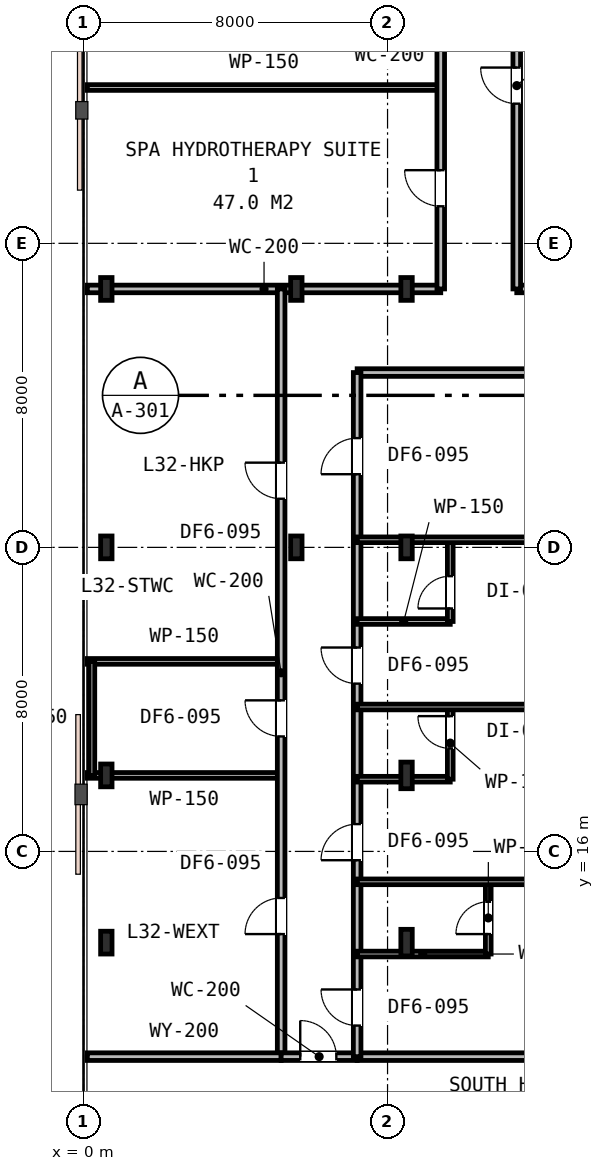
"""IFC4 building model, lengths in metres.
Left out: names, types, materials, properties, quantities, classifications, styles, units other than length and angle.
Written with IfcOpenShell. Run it as: python <this file> out.ifc"""

import sys

from ifc_helpers import new_model, si_unit, direction, frame, frame_2d, origin, origin_2d, place, context, subcontext, project, spatial, rectangle, i_section, extrude, element, fill, save


model = new_model("IFC4")
c1 = context("Model", 3, precision=1e-05, world=origin(), true_north=direction((0.0, 1.0)))
c2 = subcontext(c1, "Body", "Model", "MODEL_VIEW")
j1 = project(units=[si_unit("LENGTHUNIT", "METRE"), si_unit("PLANEANGLEUNIT", "RADIAN")], contexts=[c1])
p1 = place(None, origin())
s1 = spatial("IfcSite", under=j1, at=p1, CompositionType="ELEMENT")
p2 = place(p1, origin())
s2 = spatial("IfcBuilding", under=s1, at=p2, CompositionType="ELEMENT")
p3 = place(p2, frame((0.0, 0.0, 126.0)))
s3 = spatial("IfcBuildingStorey", under=s2, at=p3, CompositionType="ELEMENT", Elevation=126.0)
for number, where, z_axis, x_axis in (
    (1, (8.5, 24.0, 0.0), (0.0, 0.0, 1.0), (1.0, 0.0, 0.0)),
    (2, (5.6, 24.0, 0.0), (0.0, 0.0, 1.0), (1.0, 0.0, 0.0)),
    (3, (5.6, 30.8, 0.0), (0.0, 0.0, 1.0), (1.0, 0.0, 0.0)),
    (4, (8.5, 30.8, 0.0), (0.0, 0.0, 1.0), (1.0, 0.0, 0.0)),
    (5, (0.6, 24.0, 0.0), (0.0, 0.0, 1.0), (1.0, 0.0, 0.0)),
    (6, (0.6, 30.8, 0.0), (0.0, 0.0, 1.0), (1.0, 0.0, 0.0)),
    (7, (0.6, 13.6, 0.0), (0.0, 0.0, 1.0), (1.0, 0.0, 0.0)),
    (8, (0.6, 18.0, 0.0), (0.0, 0.0, 1.0), (1.0, 0.0, 0.0)),
):
    element("IfcColumn", number, at=place(p3, frame(where, z_axis=z_axis, x_axis=x_axis)), inside=s3, PredefinedType="COLUMN", context=c2, shape_type="SweptSolid", body=[
        extrude(i_section(OverallWidth=0.3, OverallDepth=0.6, WebThickness=0.015, FlangeThickness=0.03, FilletRadius=0.027, at=origin_2d()), origin(), (0.0, 0.0, 1.0), 3.6),
    ])
for number, where, z_axis, x_axis in (
    (9, (8.5, 13.6, 0.0), (0.0, 0.0, 1.0), (1.0, 0.0, 0.0)),
    (10, (8.5, 18.0, 0.0), (0.0, 0.0, 1.0), (1.0, 0.0, 0.0)),
):
    element("IfcColumn", number, at=place(p3, frame(where, z_axis=z_axis, x_axis=x_axis)), inside=s3, PredefinedType="COLUMN", context=c2, shape_type="SweptSolid", body=[
        extrude(i_section(OverallWidth=0.3, OverallDepth=0.7, WebThickness=0.017, FlangeThickness=0.032, FilletRadius=0.027, at=origin_2d()), origin(), (0.0, 0.0, 1.0), 3.6),
    ])
p4 = place(p3, frame((0.1, 30.8, 0.0), z_axis=(0.0, 0.0, 1.0), x_axis=(1.0, 0.0, 0.0)))
e11 = element("IfcWall", 11, at=p4, inside=s3, PredefinedType="PARTITIONING", context=c2, shape_type="SweptSolid", body=[
    extrude(rectangle(XDim=9.3, YDim=0.2, at=frame_2d((4.65, 0.0))), origin(), (0.0, 0.0, 1.0), 2.87),
])
p5 = place(p3, frame((7.2, 28.6, 0.0), z_axis=(0.0, 0.0, 1.0), x_axis=(1.0, 0.0, 0.0)))
e12 = element("IfcWall", 12, at=p5, inside=s3, PredefinedType="PARTITIONING", context=c2, shape_type="SweptSolid", body=[
    extrude(rectangle(XDim=37.0, YDim=0.2, at=frame_2d((18.5, 0.0))), origin(), (0.0, 0.0, 1.0), 2.87),
])
p6 = place(p5, frame((19.71, 0.0, 0.0)))
e13 = element("IfcOpeningElement", 13, at=p6, cuts=e12, PredefinedType="OPENING", context=c2, shape_type="SweptSolid", body=[
    extrude(rectangle(XDim=0.95, YDim=2.15, at=frame_2d((0.475, 1.075))), frame((0.0, 0.11, 0.0), z_axis=(0.0, -1.0, 0.0), x_axis=(1.0, 0.0, 0.0)), (0.0, 0.0, 1.0), 0.22),
])
p7 = place(p5, frame((29.78, 0.0, 0.0)))
e14 = element("IfcOpeningElement", 14, at=p7, cuts=e12, PredefinedType="OPENING", context=c2, shape_type="SweptSolid", body=[
    extrude(rectangle(XDim=0.95, YDim=2.15, at=frame_2d((0.475, 1.075))), frame((0.0, 0.11, 0.0), z_axis=(0.0, -1.0, 0.0), x_axis=(1.0, 0.0, 0.0)), (0.0, 0.0, 1.0), 0.22),
])
p8 = place(p3, frame((11.4, 30.8, 0.0), z_axis=(0.0, 0.0, 1.0), x_axis=(1.0, 0.0, 0.0)))
e15 = element("IfcWall", 15, at=p8, inside=s3, PredefinedType="PARTITIONING", context=c2, shape_type="SweptSolid", body=[
    extrude(rectangle(XDim=4.13, YDim=0.2, at=frame_2d((2.065, 0.0))), origin(), (0.0, 0.0, 1.0), 2.87),
])
p9 = place(p3, frame((0.1, 18.0, 0.0), z_axis=(0.0, 0.0, 1.0), x_axis=(1.0, 0.0, 0.0)))
e16 = element("IfcWall", 16, at=p9, inside=s3, PredefinedType="PARTITIONING", context=c2, shape_type="SweptSolid", body=[
    extrude(rectangle(XDim=5.1, YDim=0.15, at=frame_2d((2.55, 0.0))), origin(), (0.0, 0.0, 1.0), 2.87),
])
p10 = place(p3, frame((0.1, 21.0, 0.0), z_axis=(0.0, 0.0, 1.0), x_axis=(1.0, 0.0, 0.0)))
e17 = element("IfcWall", 17, at=p10, inside=s3, PredefinedType="PARTITIONING", context=c2, shape_type="SweptSolid", body=[
    extrude(rectangle(XDim=5.1, YDim=0.15, at=frame_2d((2.55, 0.0))), origin(), (0.0, 0.0, 1.0), 2.96),
])
p11 = place(p3, frame((5.2, 10.6, 0.0), z_axis=(0.0, 0.0, 1.0), x_axis=(0.0, 1.0, 0.0)))
e18 = element("IfcWall", 18, at=p11, inside=s3, PredefinedType="PARTITIONING", context=c2, shape_type="SweptSolid", body=[
    extrude(rectangle(XDim=20.2, YDim=0.2, at=frame_2d((10.1, 0.0))), origin(), (0.0, 0.0, 1.0), 2.87),
])
p12 = place(p11, frame((8.425, 0.0, 0.0)))
e19 = element("IfcOpeningElement", 19, at=p12, cuts=e18, PredefinedType="OPENING", context=c2, shape_type="SweptSolid", body=[
    extrude(rectangle(XDim=0.95, YDim=2.15, at=frame_2d((0.475, 1.075))), frame((0.0, 0.11, 0.0), z_axis=(0.0, -1.0, 0.0), x_axis=(1.0, 0.0, 0.0)), (0.0, 0.0, 1.0), 0.22),
])
p13 = place(p11, frame((14.68, 0.0, 0.0)))
e20 = element("IfcOpeningElement", 20, at=p13, cuts=e18, PredefinedType="OPENING", context=c2, shape_type="SweptSolid", body=[
    extrude(rectangle(XDim=0.95, YDim=2.15, at=frame_2d((0.475, 1.075))), frame((0.0, 0.11, 0.0), z_axis=(0.0, -1.0, 0.0), x_axis=(1.0, 0.0, 0.0)), (0.0, 0.0, 1.0), 0.22),
])
p14 = place(p11, frame((3.225, 0.0, 0.0)))
e21 = element("IfcOpeningElement", 21, at=p14, cuts=e18, PredefinedType="OPENING", context=c2, shape_type="SweptSolid", body=[
    extrude(rectangle(XDim=0.95, YDim=2.15, at=frame_2d((0.475, 1.075))), frame((0.0, 0.11, 0.0), z_axis=(0.0, -1.0, 0.0), x_axis=(1.0, 0.0, 0.0)), (0.0, 0.0, 1.0), 0.22),
])
p15 = place(p3, frame((0.22, 18.0, 0.0), z_axis=(0.0, 0.0, 1.0), x_axis=(0.0, 1.0, 0.0)))
e22 = element("IfcWall", 22, at=p15, inside=s3, PredefinedType="PARTITIONING", context=c2, shape_type="SweptSolid", body=[
    extrude(rectangle(XDim=3.0, YDim=0.15, at=frame_2d((1.5, 0.0))), origin(), (0.0, 0.0, 1.0), 2.87),
])
p16 = place(p3, frame((0.1, 36.1, 0.0), z_axis=(0.0, 0.0, 1.0), x_axis=(1.0, 0.0, 0.0)))
e23 = element("IfcWall", 23, at=p16, inside=s3, PredefinedType="PARTITIONING", context=c2, shape_type="SweptSolid", body=[
    extrude(rectangle(XDim=9.3, YDim=0.15, at=frame_2d((4.65, 0.0))), origin(), (0.0, 0.0, 1.0), 2.87),
])
p17 = place(p3, frame((9.4, 30.8, 0.0), z_axis=(0.0, 0.0, 1.0), x_axis=(0.0, 1.0, 0.0)))
e24 = element("IfcWall", 24, at=p17, inside=s3, PredefinedType="PARTITIONING", context=c2, shape_type="SweptSolid", body=[
    extrude(rectangle(XDim=10.7, YDim=0.2, at=frame_2d((5.35, 0.0))), origin(), (0.0, 0.0, 1.0), 2.87),
])
p18 = place(p17, frame((2.175, 0.0, 0.0)))
e25 = element("IfcOpeningElement", 25, at=p18, cuts=e24, PredefinedType="OPENING", context=c2, shape_type="SweptSolid", body=[
    extrude(rectangle(XDim=0.95, YDim=2.15, at=frame_2d((0.475, 1.075))), frame((0.0, 0.11, 0.0), z_axis=(0.0, -1.0, 0.0), x_axis=(1.0, 0.0, 0.0)), (0.0, 0.0, 1.0), 0.22),
])
p19 = place(p17, frame((7.525, 0.0, 0.0)))
e26 = element("IfcOpeningElement", 26, at=p19, cuts=e24, PredefinedType="OPENING", context=c2, shape_type="SweptSolid", body=[
    extrude(rectangle(XDim=0.95, YDim=2.15, at=frame_2d((0.475, 1.075))), frame((0.0, 0.11, 0.0), z_axis=(0.0, -1.0, 0.0), x_axis=(1.0, 0.0, 0.0)), (0.0, 0.0, 1.0), 0.22),
])
p20 = place(p3, frame((11.4, 30.8, 0.0), z_axis=(0.0, 0.0, 1.0), x_axis=(0.0, 1.0, 0.0)))
e27 = element("IfcWall", 27, at=p20, inside=s3, PredefinedType="PARTITIONING", context=c2, shape_type="SweptSolid", body=[
    extrude(rectangle(XDim=10.7, YDim=0.2, at=frame_2d((5.35, 0.0))), origin(), (0.0, 0.0, 1.0), 2.87),
])
p21 = place(p20, frame((4.875, 0.0, 0.0)))
e28 = element("IfcOpeningElement", 28, at=p21, cuts=e27, PredefinedType="OPENING", context=c2, shape_type="SweptSolid", body=[
    extrude(rectangle(XDim=0.95, YDim=2.15, at=frame_2d((0.475, 1.075))), frame((0.0, 0.11, 0.0), z_axis=(0.0, -1.0, 0.0), x_axis=(1.0, 0.0, 0.0)), (0.0, 0.0, 1.0), 0.22),
])
p22 = place(p3, frame((0.1, 10.6, 0.0), z_axis=(0.0, 0.0, 1.0), x_axis=(1.0, 0.0, 0.0)))
e29 = element("IfcWall", 29, at=p22, inside=s3, PredefinedType="PARTITIONING", context=c2, shape_type="SweptSolid", body=[
    extrude(rectangle(XDim=5.1, YDim=0.2, at=frame_2d((2.55, 0.0))), origin(), (0.0, 0.0, 1.0), 2.96),
])
p23 = place(p3, frame((7.2, 10.6, 0.0), z_axis=(0.0, 0.0, 1.0), x_axis=(1.0, 0.0, 0.0)))
e30 = element("IfcWall", 30, at=p23, inside=s3, PredefinedType="PARTITIONING", context=c2, shape_type="SweptSolid", body=[
    extrude(rectangle(XDim=16.7, YDim=0.2, at=frame_2d((8.35, 0.0))), origin(), (0.0, 0.0, 1.0), 2.87),
])
p24 = place(p3, frame((5.2, 10.6, 0.0), z_axis=(0.0, 0.0, 1.0), x_axis=(1.0, 0.0, 0.0)))
e31 = element("IfcWall", 31, at=p24, inside=s3, PredefinedType="PARTITIONING", context=c2, shape_type="SweptSolid", body=[
    extrude(rectangle(XDim=2.0, YDim=0.2, at=frame_2d((1.0, 0.0))), origin(), (0.0, 0.0, 1.0), 3.01),
])
p25 = place(p24, frame((0.502, 0.0, 0.0)))
e32 = element("IfcOpeningElement", 32, at=p25, cuts=e31, PredefinedType="OPENING", context=c2, shape_type="SweptSolid", body=[
    extrude(rectangle(XDim=0.95, YDim=2.15, at=frame_2d((0.475, 1.075))), frame((0.0, 0.11, 0.0), z_axis=(0.0, -1.0, 0.0), x_axis=(1.0, 0.0, 0.0)), (0.0, 0.0, 1.0), 0.22),
])
p26 = place(p3, frame((7.2, 10.6, 0.0), z_axis=(0.0, 0.0, 1.0), x_axis=(0.0, 1.0, 0.0)))
e33 = element("IfcWall", 33, at=p26, inside=s3, PredefinedType="PARTITIONING", context=c2, shape_type="SweptSolid", body=[
    extrude(rectangle(XDim=18.0, YDim=0.2, at=frame_2d((9.0, 0.0))), origin(), (0.0, 0.0, 1.0), 2.87),
])
p27 = place(p26, frame((0.818, 0.0, 0.0)))
e34 = element("IfcOpeningElement", 34, at=p27, cuts=e33, PredefinedType="OPENING", context=c2, shape_type="SweptSolid", body=[
    extrude(rectangle(XDim=0.95, YDim=2.15, at=frame_2d((0.475, 1.075))), frame((0.0, 0.11, 0.0), z_axis=(0.0, -1.0, 0.0), x_axis=(1.0, 0.0, 0.0)), (0.0, 0.0, 1.0), 0.22),
])
p28 = place(p26, frame((5.169, 0.0, 0.0)))
e35 = element("IfcOpeningElement", 35, at=p28, cuts=e33, PredefinedType="OPENING", context=c2, shape_type="SweptSolid", body=[
    extrude(rectangle(XDim=0.95, YDim=2.15, at=frame_2d((0.475, 1.075))), frame((0.0, 0.11, 0.0), z_axis=(0.0, -1.0, 0.0), x_axis=(1.0, 0.0, 0.0)), (0.0, 0.0, 1.0), 0.22),
])
p29 = place(p26, frame((9.815, 0.0, 0.0)))
e36 = element("IfcOpeningElement", 36, at=p29, cuts=e33, PredefinedType="OPENING", context=c2, shape_type="SweptSolid", body=[
    extrude(rectangle(XDim=0.95, YDim=2.15, at=frame_2d((0.475, 1.075))), frame((0.0, 0.11, 0.0), z_axis=(0.0, -1.0, 0.0), x_axis=(1.0, 0.0, 0.0)), (0.0, 0.0, 1.0), 0.22),
])
p30 = place(p26, frame((15.325, 0.0, 0.0)))
e37 = element("IfcOpeningElement", 37, at=p30, cuts=e33, PredefinedType="OPENING", context=c2, shape_type="SweptSolid", body=[
    extrude(rectangle(XDim=0.95, YDim=2.15, at=frame_2d((0.475, 1.075))), frame((0.0, 0.11, 0.0), z_axis=(0.0, -1.0, 0.0), x_axis=(1.0, 0.0, 0.0)), (0.0, 0.0, 1.0), 0.22),
])
p31 = place(p3, frame((7.2, 13.3, 0.0), z_axis=(0.0, 0.0, 1.0), x_axis=(1.0, 0.0, 0.0)))
e38 = element("IfcWall", 38, at=p31, inside=s3, PredefinedType="PARTITIONING", context=c2, shape_type="SweptSolid", body=[
    extrude(rectangle(XDim=3.45, YDim=0.15, at=frame_2d((1.725, 0.0))), origin(), (0.0, 0.0, 1.0), 2.87),
])
p32 = place(p3, frame((10.65, 13.3, 0.0), z_axis=(0.0, 0.0, 1.0), x_axis=(0.0, 1.0, 0.0)))
e39 = element("IfcWall", 39, at=p32, inside=s3, PredefinedType="PARTITIONING", context=c2, shape_type="SweptSolid", body=[
    extrude(rectangle(XDim=1.9, YDim=0.15, at=frame_2d((0.95, 0.0))), origin(), (0.0, 0.0, 1.0), 2.87),
])
p33 = place(p32, frame((0.525, 0.0, 0.0)))
e40 = element("IfcOpeningElement", 40, at=p33, cuts=e39, PredefinedType="OPENING", context=c2, shape_type="SweptSolid", body=[
    extrude(rectangle(XDim=0.85, YDim=2.15, at=frame_2d((0.425, 1.075))), frame((0.0, 0.085, 0.0), z_axis=(0.0, -1.0, 0.0), x_axis=(1.0, 0.0, 0.0)), (0.0, 0.0, 1.0), 0.17),
])
p34 = place(p3, frame((7.2, 15.2, 0.0), z_axis=(0.0, 0.0, 1.0), x_axis=(1.0, 0.0, 0.0)))
e41 = element("IfcWall", 41, at=p34, inside=s3, PredefinedType="PARTITIONING", context=c2, shape_type="SweptSolid", body=[
    extrude(rectangle(XDim=16.7, YDim=0.15, at=frame_2d((8.35, 0.0))), origin(), (0.0, 0.0, 1.0), 2.87),
])
p35 = place(p3, frame((7.2, 17.9, 0.0), z_axis=(0.0, 0.0, 1.0), x_axis=(1.0, 0.0, 0.0)))
e42 = element("IfcWall", 42, at=p35, inside=s3, PredefinedType="PARTITIONING", context=c2, shape_type="SweptSolid", body=[
    extrude(rectangle(XDim=2.45, YDim=0.15, at=frame_2d((1.225, 0.0))), origin(), (0.0, 0.0, 1.0), 2.87),
])
p36 = place(p3, frame((9.65, 17.9, 0.0), z_axis=(0.0, 0.0, 1.0), x_axis=(0.0, 1.0, 0.0)))
e43 = element("IfcWall", 43, at=p36, inside=s3, PredefinedType="PARTITIONING", context=c2, shape_type="SweptSolid", body=[
    extrude(rectangle(XDim=1.9, YDim=0.15, at=frame_2d((0.95, 0.0))), origin(), (0.0, 0.0, 1.0), 2.87),
])
p37 = place(p36, frame((0.81, 0.0, 0.0)))
e44 = element("IfcOpeningElement", 44, at=p37, cuts=e43, PredefinedType="OPENING", context=c2, shape_type="SweptSolid", body=[
    extrude(rectangle(XDim=0.85, YDim=2.15, at=frame_2d((0.425, 1.075))), frame((0.0, 0.085, 0.0), z_axis=(0.0, -1.0, 0.0), x_axis=(1.0, 0.0, 0.0)), (0.0, 0.0, 1.0), 0.17),
])
p38 = place(p3, frame((7.2, 19.8, 0.0), z_axis=(0.0, 0.0, 1.0), x_axis=(1.0, 0.0, 0.0)))
e45 = element("IfcWall", 45, at=p38, inside=s3, PredefinedType="PARTITIONING", context=c2, shape_type="SweptSolid", body=[
    extrude(rectangle(XDim=16.7, YDim=0.15, at=frame_2d((8.35, 0.0))), origin(), (0.0, 0.0, 1.0), 2.87),
])
p39 = place(p3, frame((7.2, 22.05, 0.0), z_axis=(0.0, 0.0, 1.0), x_axis=(1.0, 0.0, 0.0)))
e46 = element("IfcWall", 46, at=p39, inside=s3, PredefinedType="PARTITIONING", context=c2, shape_type="SweptSolid", body=[
    extrude(rectangle(XDim=2.45, YDim=0.15, at=frame_2d((1.225, 0.0))), origin(), (0.0, 0.0, 1.0), 2.87),
])
p40 = place(p3, frame((9.65, 22.05, 0.0), z_axis=(0.0, 0.0, 1.0), x_axis=(0.0, 1.0, 0.0)))
e47 = element("IfcWall", 47, at=p40, inside=s3, PredefinedType="PARTITIONING", context=c2, shape_type="SweptSolid", body=[
    extrude(rectangle(XDim=2.15, YDim=0.15, at=frame_2d((1.075, 0.0))), origin(), (0.0, 0.0, 1.0), 2.87),
])
p41 = place(p40, frame((0.343, 0.0, 0.0)))
e48 = element("IfcOpeningElement", 48, at=p41, cuts=e47, PredefinedType="OPENING", context=c2, shape_type="SweptSolid", body=[
    extrude(rectangle(XDim=0.85, YDim=2.15, at=frame_2d((0.425, 1.075))), frame((0.0, 0.085, 0.0), z_axis=(0.0, -1.0, 0.0), x_axis=(1.0, 0.0, 0.0)), (0.0, 0.0, 1.0), 0.17),
])
p42 = place(p3, frame((7.2, 24.2, 0.0), z_axis=(0.0, 0.0, 1.0), x_axis=(1.0, 0.0, 0.0)))
e49 = element("IfcWall", 49, at=p42, inside=s3, PredefinedType="PARTITIONING", context=c2, shape_type="SweptSolid", body=[
    extrude(rectangle(XDim=16.7, YDim=0.15, at=frame_2d((8.35, 0.0))), origin(), (0.0, 0.0, 1.0), 2.87),
])
p43 = place(p12, origin())
e50 = element("IfcDoor", 50, at=p43, inside=s3, OperationType="SINGLE_SWING_RIGHT", PredefinedType="DOOR", context=c2, shape_type="SweptSolid", body=[
    extrude(rectangle(XDim=0.95, YDim=2.15, at=frame_2d((0.475, 1.075))), frame((0.0, 0.025, 0.0), z_axis=(0.0, -1.0, 0.0), x_axis=(1.0, 0.0, 0.0)), (0.0, 0.0, 1.0), 0.05),
])
fill(e19, e50)
p44 = place(p13, origin())
e51 = element("IfcDoor", 51, at=p44, inside=s3, OperationType="SINGLE_SWING_RIGHT", PredefinedType="DOOR", context=c2, shape_type="SweptSolid", body=[
    extrude(rectangle(XDim=0.95, YDim=2.15, at=frame_2d((0.475, 1.075))), frame((0.0, 0.025, 0.0), z_axis=(0.0, -1.0, 0.0), x_axis=(1.0, 0.0, 0.0)), (0.0, 0.0, 1.0), 0.05),
])
fill(e20, e51)
p45 = place(p14, origin())
e52 = element("IfcDoor", 52, at=p45, inside=s3, OperationType="SINGLE_SWING_LEFT", PredefinedType="DOOR", context=c2, shape_type="SweptSolid", body=[
    extrude(rectangle(XDim=0.95, YDim=2.15, at=frame_2d((0.475, 1.075))), frame((0.0, 0.025, 0.0), z_axis=(0.0, -1.0, 0.0), x_axis=(1.0, 0.0, 0.0)), (0.0, 0.0, 1.0), 0.05),
])
fill(e21, e52)
p46 = place(p18, origin())
e53 = element("IfcDoor", 53, at=p46, inside=s3, OperationType="SINGLE_SWING_RIGHT", PredefinedType="DOOR", context=c2, shape_type="SweptSolid", body=[
    extrude(rectangle(XDim=0.95, YDim=2.15, at=frame_2d((0.475, 1.075))), frame((0.0, 0.025, 0.0), z_axis=(0.0, -1.0, 0.0), x_axis=(1.0, 0.0, 0.0)), (0.0, 0.0, 1.0), 0.05),
])
fill(e25, e53)
p47 = place(p21, origin())
e54 = element("IfcDoor", 54, at=p47, inside=s3, OperationType="SINGLE_SWING_RIGHT", PredefinedType="DOOR", context=c2, shape_type="SweptSolid", body=[
    extrude(rectangle(XDim=0.95, YDim=2.15, at=frame_2d((0.475, 1.075))), frame((0.0, 0.025, 0.0), z_axis=(0.0, -1.0, 0.0), x_axis=(1.0, 0.0, 0.0)), (0.0, 0.0, 1.0), 0.05),
])
fill(e28, e54)
p48 = place(p25, origin())
e55 = element("IfcDoor", 55, at=p48, inside=s3, OperationType="SINGLE_SWING_LEFT", PredefinedType="DOOR", context=c2, shape_type="SweptSolid", body=[
    extrude(rectangle(XDim=0.95, YDim=2.15, at=frame_2d((0.475, 1.075))), frame((0.0, 0.025, 0.0), z_axis=(0.0, -1.0, 0.0), x_axis=(1.0, 0.0, 0.0)), (0.0, 0.0, 1.0), 0.05),
])
fill(e32, e55)
p49 = place(p27, origin())
e56 = element("IfcDoor", 56, at=p49, inside=s3, OperationType="SINGLE_SWING_RIGHT", PredefinedType="DOOR", context=c2, shape_type="SweptSolid", body=[
    extrude(rectangle(XDim=0.95, YDim=2.15, at=frame_2d((0.475, 1.075))), frame((0.0, 0.025, 0.0), z_axis=(0.0, -1.0, 0.0), x_axis=(1.0, 0.0, 0.0)), (0.0, 0.0, 1.0), 0.05),
])
fill(e34, e56)
p50 = place(p33, origin())
e57 = element("IfcDoor", 57, at=p50, inside=s3, OperationType="SINGLE_SWING_LEFT", PredefinedType="DOOR", context=c2, shape_type="SweptSolid", body=[
    extrude(rectangle(XDim=0.85, YDim=2.15, at=frame_2d((0.425, 1.075))), frame((0.0, 0.025, 0.0), z_axis=(0.0, -1.0, 0.0), x_axis=(1.0, 0.0, 0.0)), (0.0, 0.0, 1.0), 0.05),
])
fill(e40, e57)
p51 = place(p28, origin())
e58 = element("IfcDoor", 58, at=p51, inside=s3, OperationType="SINGLE_SWING_LEFT", PredefinedType="DOOR", context=c2, shape_type="SweptSolid", body=[
    extrude(rectangle(XDim=0.95, YDim=2.15, at=frame_2d((0.475, 1.075))), frame((0.0, 0.025, 0.0), z_axis=(0.0, -1.0, 0.0), x_axis=(1.0, 0.0, 0.0)), (0.0, 0.0, 1.0), 0.05),
])
fill(e35, e58)
p52 = place(p37, origin())
e59 = element("IfcDoor", 59, at=p52, inside=s3, OperationType="SINGLE_SWING_RIGHT", PredefinedType="DOOR", context=c2, shape_type="SweptSolid", body=[
    extrude(rectangle(XDim=0.85, YDim=2.15, at=frame_2d((0.425, 1.075))), frame((0.0, 0.025, 0.0), z_axis=(0.0, -1.0, 0.0), x_axis=(1.0, 0.0, 0.0)), (0.0, 0.0, 1.0), 0.05),
])
fill(e44, e59)
p53 = place(p29, origin())
e60 = element("IfcDoor", 60, at=p53, inside=s3, OperationType="SINGLE_SWING_RIGHT", PredefinedType="DOOR", context=c2, shape_type="SweptSolid", body=[
    extrude(rectangle(XDim=0.95, YDim=2.15, at=frame_2d((0.475, 1.075))), frame((0.0, 0.025, 0.0), z_axis=(0.0, -1.0, 0.0), x_axis=(1.0, 0.0, 0.0)), (0.0, 0.0, 1.0), 0.05),
])
fill(e36, e60)
p54 = place(p41, origin())
e61 = element("IfcDoor", 61, at=p54, inside=s3, OperationType="SINGLE_SWING_LEFT", PredefinedType="DOOR", context=c2, shape_type="SweptSolid", body=[
    extrude(rectangle(XDim=0.85, YDim=2.15, at=frame_2d((0.425, 1.075))), frame((0.0, 0.025, 0.0), z_axis=(0.0, -1.0, 0.0), x_axis=(1.0, 0.0, 0.0)), (0.0, 0.0, 1.0), 0.05),
])
fill(e48, e61)
p55 = place(p30, origin())
e62 = element("IfcDoor", 62, at=p55, inside=s3, OperationType="SINGLE_SWING_LEFT", PredefinedType="DOOR", context=c2, shape_type="SweptSolid", body=[
    extrude(rectangle(XDim=0.95, YDim=2.15, at=frame_2d((0.475, 1.075))), frame((0.0, 0.025, 0.0), z_axis=(0.0, -1.0, 0.0), x_axis=(1.0, 0.0, 0.0)), (0.0, 0.0, 1.0), 0.05),
])
fill(e37, e62)
save(model, sys.argv[1])
